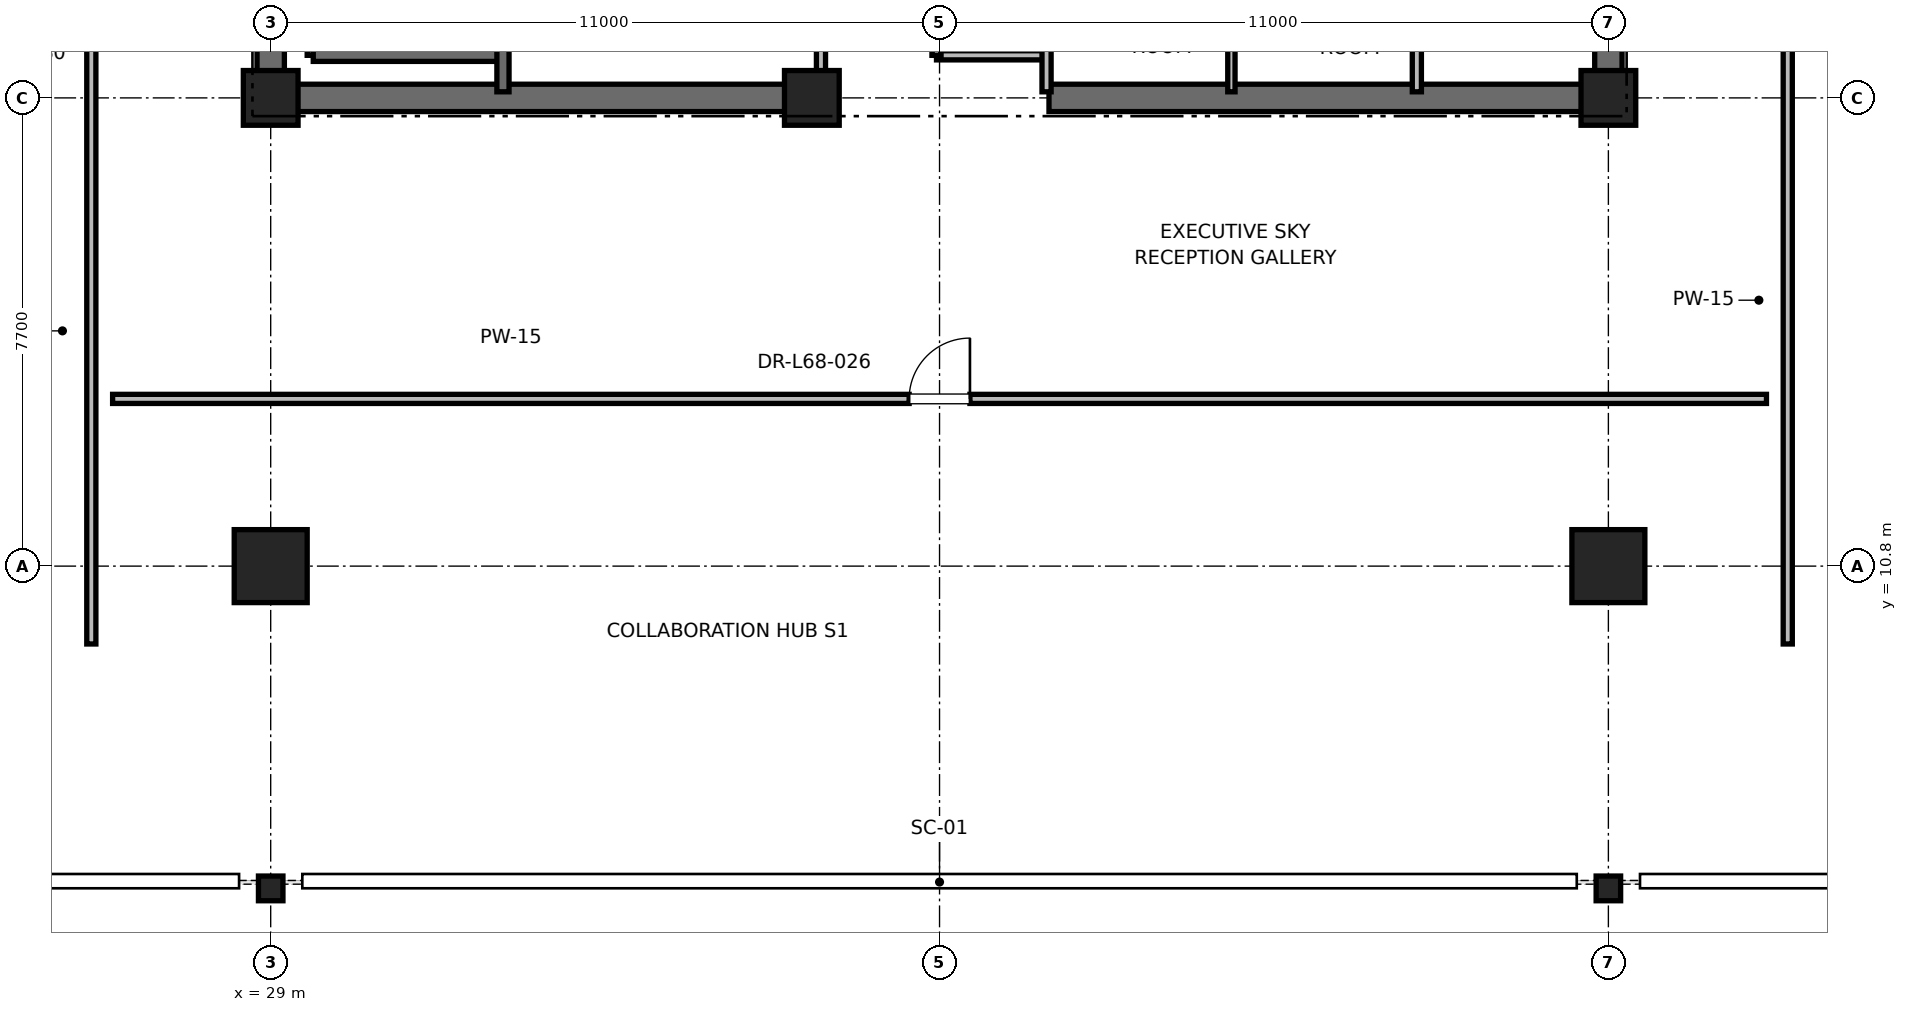
"""IFC4 building model, lengths in metres.
Left out: names, types, materials, properties, quantities, classifications, styles, units other than length and angle.
Written with IfcOpenShell. Run it as: python <this file> out.ifc"""

import sys

from ifc_helpers import new_model, si_unit, direction, frame, frame_2d, origin, origin_2d, place, context, subcontext, project, spatial, rectangle, i_section, extrude, element, fill, save


model = new_model("IFC4")
c1 = context("Model", 3, precision=1e-05, world=origin(), true_north=direction((0.0, 1.0)))
c2 = subcontext(c1, "Body", "Model", "MODEL_VIEW")
j1 = project(units=[si_unit("LENGTHUNIT", "METRE"), si_unit("PLANEANGLEUNIT", "RADIAN")], contexts=[c1])
p1 = place(None, origin())
s1 = spatial("IfcSite", under=j1, at=p1, CompositionType="ELEMENT")
p2 = place(p1, origin())
s2 = spatial("IfcBuilding", under=s1, at=p2, CompositionType="ELEMENT")
p3 = place(p2, frame((0.0, 0.0, 291.2)))
s3 = spatial("IfcBuildingStorey", under=s2, at=p3, CompositionType="ELEMENT", Elevation=291.2)
for number, where, z_axis, x_axis in (
    (1, (29.0, 10.8, 0.0), (0.0, 0.0, 1.0), (1.0, 0.0, 0.0)),
    (2, (51.0, 10.8, 0.0), (0.0, 0.0, 1.0), (1.0, 0.0, 0.0)),
):
    element("IfcColumn", number, at=place(p3, frame(where, z_axis=z_axis, x_axis=x_axis)), inside=s3, PredefinedType="COLUMN", context=c2, shape_type="SweptSolid", body=[
        extrude(rectangle(XDim=1.2, YDim=1.2, at=origin_2d()), origin(), (0.0, 0.0, 1.0), 4.0),
    ])
for number, where, z_axis, x_axis in (
    (3, (29.0, 5.5, 0.0), (0.0, 0.0, 1.0), (1.0, 0.0, 0.0)),
    (4, (51.0, 5.5, 0.0), (0.0, 0.0, 1.0), (1.0, 0.0, 0.0)),
):
    element("IfcColumn", number, at=place(p3, frame(where, z_axis=z_axis, x_axis=x_axis)), inside=s3, PredefinedType="COLUMN", context=c2, shape_type="SweptSolid", body=[
        extrude(i_section(OverallWidth=0.403, OverallDepth=0.406, WebThickness=0.027, FlangeThickness=0.043, FilletRadius=0.015, at=origin_2d()), origin(), (0.0, 0.0, 1.0), 4.0),
    ])
for number, where, z_axis, x_axis in (
    (5, (29.0, 18.5, 0.0), (0.0, 0.0, 1.0), (1.0, 0.0, 0.0)),
    (6, (51.0, 18.5, 0.0), (0.0, 0.0, 1.0), (1.0, 0.0, 0.0)),
    (7, (37.9, 18.5, 0.0), (0.0, 0.0, 1.0), (1.0, 0.0, 0.0)),
):
    element("IfcColumn", number, at=place(p3, frame(where, z_axis=z_axis, x_axis=x_axis)), inside=s3, PredefinedType="PILASTER", context=c2, shape_type="SweptSolid", body=[
        extrude(rectangle(XDim=0.9, YDim=0.9, at=origin_2d()), origin(), (0.0, 0.0, 1.0), 4.0),
    ])
for number, where, z_axis, x_axis in (
    (8, (29.0, 18.5, 0.0), (0.0, 0.0, 1.0), (1.0, 0.0, 0.0)),
    (9, (41.8, 18.5, 0.0), (0.0, 0.0, 1.0), (1.0, 0.0, 0.0)),
):
    element("IfcWall", number, at=place(p3, frame(where, z_axis=z_axis, x_axis=x_axis)), inside=s3, PredefinedType="SHEAR", context=c2, shape_type="SweptSolid", body=[
        extrude(rectangle(XDim=9.2, YDim=0.45, at=frame_2d((4.6, 0.0))), origin(), (0.0, 0.0, 1.0), 3.7),
    ])
p4 = place(p3, frame((29.0, 18.5, 0.0), z_axis=(0.0, 0.0, 1.0), x_axis=(0.0, 1.0, 0.0)))
e10 = element("IfcWall", 10, at=p4, inside=s3, PredefinedType="SHEAR", context=c2, shape_type="SweptSolid", body=[
    extrude(rectangle(XDim=8.8, YDim=0.45, at=frame_2d((4.4, 0.0))), origin(), (0.0, 0.0, 1.0), 3.7),
])
p5 = place(p3, frame((51.0, 18.5, 0.0), z_axis=(0.0, 0.0, 1.0), x_axis=(0.0, 1.0, 0.0)))
e11 = element("IfcWall", 11, at=p5, inside=s3, PredefinedType="SHEAR", context=c2, shape_type="SweptSolid", body=[
    extrude(rectangle(XDim=5.8, YDim=0.45, at=frame_2d((2.9, 0.0))), origin(), (0.0, 0.0, 1.0), 3.7),
])
p6 = place(p3, frame((29.7, 19.2, 0.0), z_axis=(0.0, 0.0, 1.0), x_axis=(0.0, 1.0, 0.0)))
e12 = element("IfcWall", 12, at=p6, inside=s3, PredefinedType="SOLIDWALL", context=c2, shape_type="SweptSolid", body=[
    extrude(rectangle(XDim=8.15, YDim=0.2, at=frame_2d((4.075, 0.0))), origin(), (0.0, 0.0, 1.0), 3.7),
])
p7 = place(p3, frame((29.7, 19.2, 0.0), z_axis=(0.0, 0.0, 1.0), x_axis=(1.0, 0.0, 0.0)))
e13 = element("IfcWall", 13, at=p7, inside=s3, PredefinedType="SOLIDWALL", context=c2, shape_type="SweptSolid", body=[
    extrude(rectangle(XDim=3.12, YDim=0.2, at=frame_2d((1.56, 0.0))), origin(), (0.0, 0.0, 1.0), 3.7),
])
p8 = place(p3, frame((32.82, 18.6, 0.0), z_axis=(0.0, 0.0, 1.0), x_axis=(0.0, 1.0, 0.0)))
e14 = element("IfcWall", 14, at=p8, inside=s3, PredefinedType="SOLIDWALL", context=c2, shape_type="SweptSolid", body=[
    extrude(rectangle(XDim=8.78, YDim=0.2, at=frame_2d((4.39, 0.0))), origin(), (0.0, 0.0, 1.0), 3.7),
])
p9 = place(p3, frame((39.95, 19.2, 0.0), z_axis=(0.0, 0.0, 1.0), x_axis=(1.0, 0.0, 0.0)))
e15 = element("IfcWall", 15, at=p9, inside=s3, PredefinedType="PARTITIONING", context=c2, shape_type="SweptSolid", body=[
    extrude(rectangle(XDim=1.81, YDim=0.15, at=frame_2d((0.905, 0.0))), origin(), (0.0, 0.0, 1.0), 2.85),
])
p10 = place(p3, frame((41.76, 18.6, 0.0), z_axis=(0.0, 0.0, 1.0), x_axis=(0.0, 1.0, 0.0)))
e16 = element("IfcWall", 16, at=p10, inside=s3, PredefinedType="PARTITIONING", context=c2, shape_type="SweptSolid", body=[
    extrude(rectangle(XDim=3.6, YDim=0.15, at=frame_2d((1.8, 0.0))), origin(), (0.0, 0.0, 1.0), 2.78),
])
p11 = place(p3, frame((39.95, 19.2, 0.0), z_axis=(0.0, 0.0, 1.0), x_axis=(0.0, 1.0, 0.0)))
e17 = element("IfcWall", 17, at=p11, inside=s3, PredefinedType="PARTITIONING", context=c2, shape_type="SweptSolid", body=[
    extrude(rectangle(XDim=3.0, YDim=0.15, at=frame_2d((1.5, 0.0))), origin(), (0.0, 0.0, 1.0), 2.85),
])
p12 = place(p11, frame((1.05, 0.0, 0.0)))
e18 = element("IfcOpeningElement", 18, at=p12, cuts=e17, PredefinedType="OPENING", context=c2, shape_type="SweptSolid", body=[
    extrude(rectangle(XDim=0.9, YDim=2.1, at=frame_2d((0.45, 1.05))), frame((0.0, 0.075, 0.0), z_axis=(0.0, -1.0, 0.0), x_axis=(1.0, 0.0, 0.0)), (0.0, 0.0, 1.0), 0.15),
])
p13 = place(p3, frame((38.05, 18.6, 0.0), z_axis=(0.0, 0.0, 1.0), x_axis=(0.0, 1.0, 0.0)))
e19 = element("IfcWall", 19, at=p13, inside=s3, PredefinedType="PARTITIONING", context=c2, shape_type="SweptSolid", body=[
    extrude(rectangle(XDim=4.46, YDim=0.15, at=frame_2d((2.23, 0.0))), origin(), (0.0, 0.0, 1.0), 2.78),
])
p14 = place(p13, frame((1.73, 0.0, 0.0)))
e20 = element("IfcOpeningElement", 20, at=p14, cuts=e19, PredefinedType="OPENING", context=c2, shape_type="SweptSolid", body=[
    extrude(rectangle(XDim=1.0, YDim=2.15, at=frame_2d((0.5, 1.075))), frame((0.0, 0.075, 0.0), z_axis=(0.0, -1.0, 0.0), x_axis=(1.0, 0.0, 0.0)), (0.0, 0.0, 1.0), 0.15),
])
p15 = place(p3, frame((47.85, 18.6, 0.0), z_axis=(0.0, 0.0, 1.0), x_axis=(0.0, 1.0, 0.0)))
e21 = element("IfcWall", 21, at=p15, inside=s3, PredefinedType="PARTITIONING", context=c2, shape_type="SweptSolid", body=[
    extrude(rectangle(XDim=2.54, YDim=0.15, at=frame_2d((1.27, 0.0))), origin(), (0.0, 0.0, 1.0), 2.85),
])
p16 = place(p3, frame((44.8, 18.6, 0.0), z_axis=(0.0, 0.0, 1.0), x_axis=(0.0, 1.0, 0.0)))
e22 = element("IfcWall", 22, at=p16, inside=s3, PredefinedType="PARTITIONING", context=c2, shape_type="SweptSolid", body=[
    extrude(rectangle(XDim=3.02, YDim=0.12, at=frame_2d((1.51, 0.0))), origin(), (0.0, 0.0, 1.0), 2.85),
])
p17 = place(p3, frame((26.4, 13.55, 0.0), z_axis=(0.0, 0.0, 1.0), x_axis=(1.0, 0.0, 0.0)))
e23 = element("IfcWall", 23, at=p17, inside=s3, PredefinedType="PARTITIONING", context=c2, shape_type="SweptSolid", body=[
    extrude(rectangle(XDim=27.2, YDim=0.15, at=frame_2d((13.6, 0.0))), origin(), (0.0, 0.0, 1.0), 2.753),
])
p18 = place(p17, frame((13.1, 0.0, 0.0)))
e24 = element("IfcOpeningElement", 24, at=p18, cuts=e23, PredefinedType="OPENING", context=c2, shape_type="SweptSolid", body=[
    extrude(rectangle(XDim=1.0, YDim=2.15, at=frame_2d((0.5, 1.075))), frame((0.0, 0.075, 0.0), z_axis=(0.0, -1.0, 0.0), x_axis=(1.0, 0.0, 0.0)), (0.0, 0.0, 1.0), 0.15),
])
p19 = place(p3, frame((26.05, 9.519, 0.0), z_axis=(0.0, 0.0, 1.0), x_axis=(0.0, 1.0, 0.0)))
e25 = element("IfcWall", 25, at=p19, inside=s3, PredefinedType="PARTITIONING", context=c2, shape_type="SweptSolid", body=[
    extrude(rectangle(XDim=12.586, YDim=0.15, at=frame_2d((6.293, 0.0))), origin(), (0.0, 0.0, 1.0), 2.753),
])
p20 = place(p19, frame((10.299, 0.0, 0.0)))
e26 = element("IfcOpeningElement", 26, at=p20, cuts=e25, PredefinedType="OPENING", context=c2, shape_type="SweptSolid", body=[
    extrude(rectangle(XDim=1.0, YDim=2.15, at=frame_2d((0.5, 1.075))), frame((0.0, 0.075, 0.0), z_axis=(0.0, -1.0, 0.0), x_axis=(1.0, 0.0, 0.0)), (0.0, 0.0, 1.0), 0.15),
])
p21 = place(p3, frame((53.95, 9.519, 0.0), z_axis=(0.0, 0.0, 1.0), x_axis=(0.0, 1.0, 0.0)))
e27 = element("IfcWall", 27, at=p21, inside=s3, PredefinedType="PARTITIONING", context=c2, shape_type="SweptSolid", body=[
    extrude(rectangle(XDim=15.104, YDim=0.15, at=frame_2d((7.552, 0.0))), origin(), (0.0, 0.0, 1.0), 2.753),
])
p22 = place(p21, frame((11.307, 0.0, 0.0)))
e28 = element("IfcOpeningElement", 28, at=p22, cuts=e27, PredefinedType="OPENING", context=c2, shape_type="SweptSolid", body=[
    extrude(rectangle(XDim=1.5, YDim=2.25, at=frame_2d((0.75, 1.125))), frame((0.0, 0.075, 0.0), z_axis=(0.0, -1.0, 0.0), x_axis=(1.0, 0.0, 0.0)), (0.0, 0.0, 1.0), 0.15),
])
p23 = place(p18, origin())
e29 = element("IfcDoor", 29, at=p23, inside=s3, OperationType="SINGLE_SWING_RIGHT", PredefinedType="DOOR", context=c2, shape_type="SweptSolid", body=[
    extrude(rectangle(XDim=1.0, YDim=2.15, at=frame_2d((0.5, 1.075))), frame((0.0, 0.025, 0.0), z_axis=(0.0, -1.0, 0.0), x_axis=(1.0, 0.0, 0.0)), (0.0, 0.0, 1.0), 0.05),
])
fill(e24, e29)
save(model, sys.argv[1])
